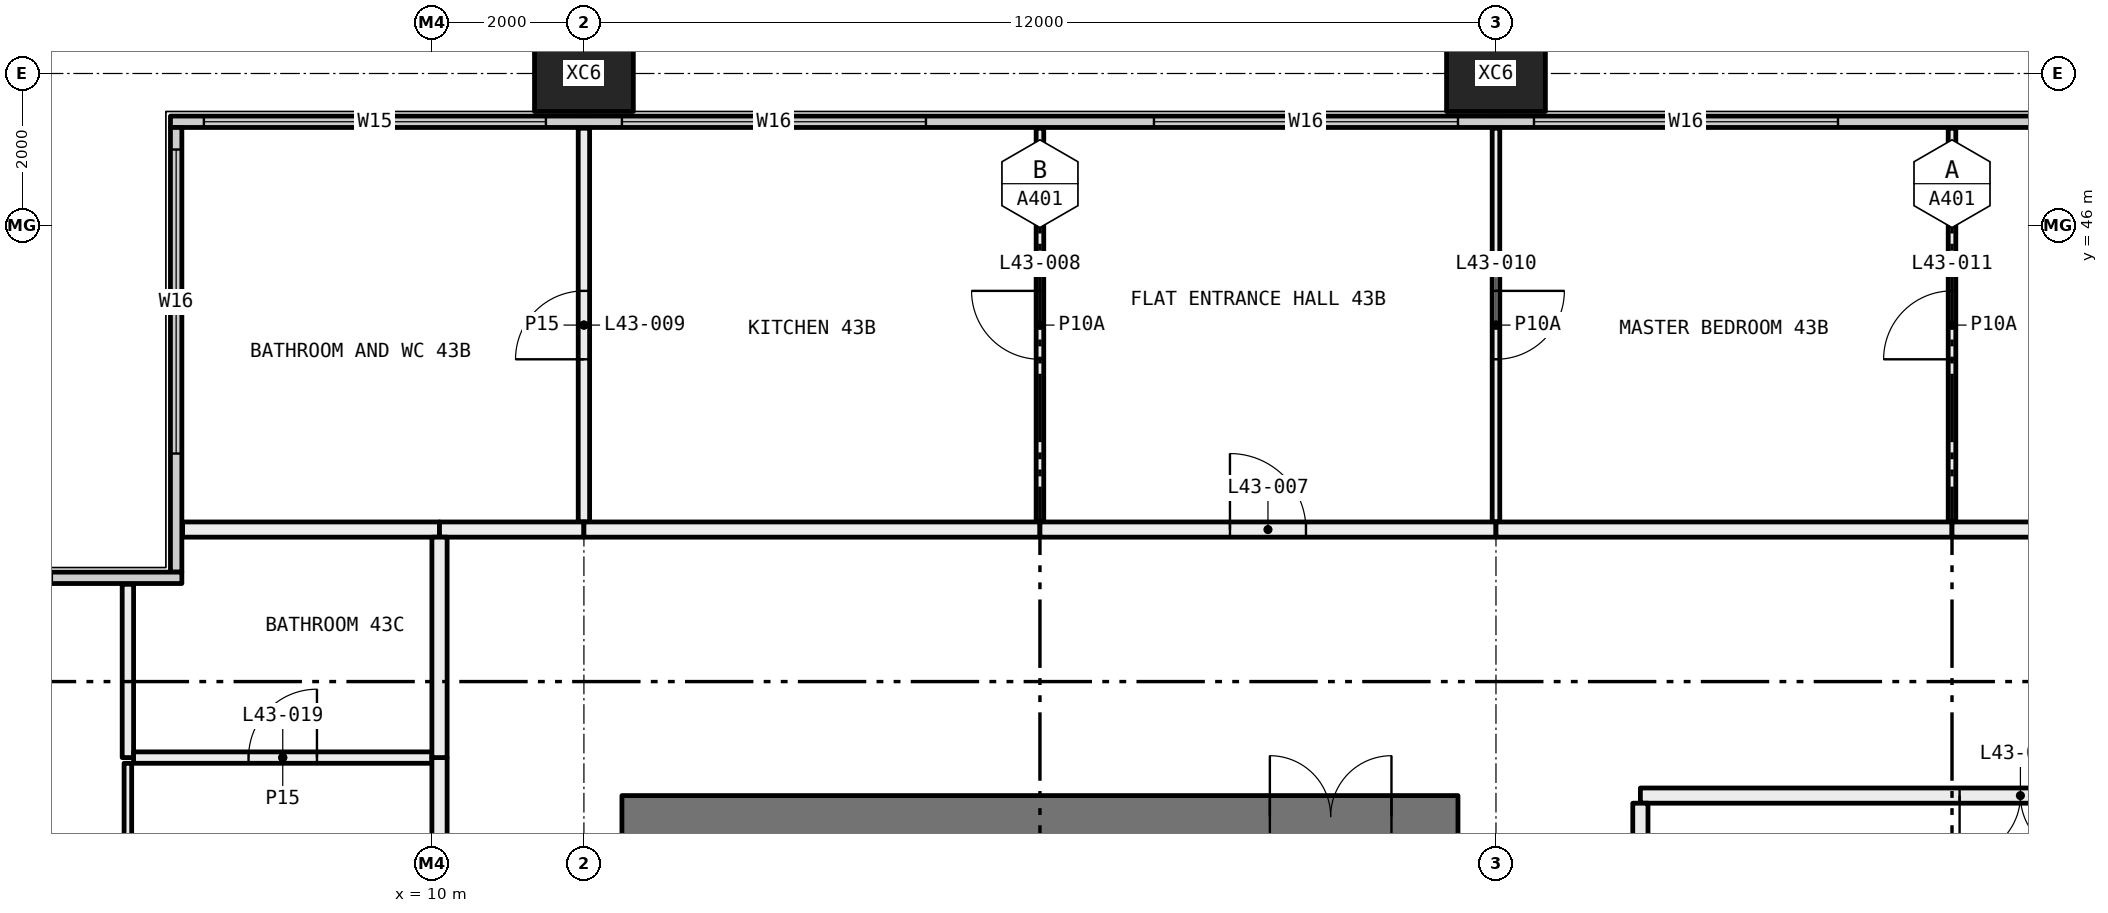
"""IFC4 building model, lengths in metres.
Left out: names, types, materials, properties, quantities, classifications, styles, units other than length and angle.
Written with IfcOpenShell. Run it as: python <this file> out.ifc"""

import sys

from ifc_helpers import new_model, si_unit, direction, frame, frame_2d, origin, origin_2d, place, context, subcontext, project, spatial, rectangle, hollow_rectangle, extrude, element, fill, save


model = new_model("IFC4")
c1 = context("Model", 3, precision=1e-05, world=origin(), true_north=direction((0.0, 1.0)))
c2 = subcontext(c1, "Body", "Model", "MODEL_VIEW")
j1 = project(units=[si_unit("LENGTHUNIT", "METRE"), si_unit("PLANEANGLEUNIT", "RADIAN")], contexts=[c1])
p1 = place(None, origin())
s1 = spatial("IfcSite", under=j1, at=p1, CompositionType="ELEMENT")
p2 = place(p1, origin())
s2 = spatial("IfcBuilding", under=s1, at=p2, CompositionType="ELEMENT")
p3 = place(p2, frame((0.0, 0.0, 165.15)))
s3 = spatial("IfcBuildingStorey", under=s2, at=p3, CompositionType="ELEMENT", Elevation=165.15)
for number, where, z_axis, x_axis in (
    (1, (12.0, 48.0, -0.4), (0.0, 0.0, 1.0), (1.0, 0.0, 0.0)),
    (2, (24.0, 48.0, -0.4), (0.0, 0.0, 1.0), (1.0, 0.0, 0.0)),
):
    element("IfcColumn", number, at=place(p3, frame(where, z_axis=z_axis, x_axis=x_axis)), inside=s3, PredefinedType="COLUMN", context=c2, shape_type="SweptSolid", body=[
        extrude(hollow_rectangle(XDim=1.3, YDim=1.0, WallThickness=0.05, at=origin_2d()), origin(), (0.0, 0.0, 1.0), 3.45),
    ])
p4 = place(p3, frame((6.56, 47.365, 0.0), z_axis=(0.0, 0.0, 1.0), x_axis=(1.0, 0.0, 0.0)))
e3 = element("IfcWall", 3, at=p4, inside=s3, PredefinedType="ELEMENTEDWALL", context=c2, shape_type="SweptSolid", body=[
    extrude(rectangle(XDim=46.88, YDim=0.15, at=frame_2d((23.44, 0.0))), origin(), (0.0, 0.0, 1.0), 3.05),
])
p5 = place(p4, frame((0.44, 0.0, 0.45)))
e4 = element("IfcOpeningElement", 4, at=p5, cuts=e3, PredefinedType="OPENING", context=c2, shape_type="SweptSolid", body=[
    extrude(rectangle(XDim=4.5, YDim=2.55, at=frame_2d((2.25, 1.275))), frame((0.0, 0.085, 0.0), z_axis=(0.0, -1.0, 0.0), x_axis=(1.0, 0.0, 0.0)), (0.0, 0.0, 1.0), 0.17),
])
p6 = place(p4, frame((5.94, 0.0, 0.45)))
e5 = element("IfcOpeningElement", 5, at=p6, cuts=e3, PredefinedType="OPENING", context=c2, shape_type="SweptSolid", body=[
    extrude(rectangle(XDim=4.0, YDim=2.55, at=frame_2d((2.0, 1.275))), frame((0.0, 0.085, 0.0), z_axis=(0.0, -1.0, 0.0), x_axis=(1.0, 0.0, 0.0)), (0.0, 0.0, 1.0), 0.17),
])
p7 = place(p4, frame((12.94, 0.0, 0.45)))
e6 = element("IfcOpeningElement", 6, at=p7, cuts=e3, PredefinedType="OPENING", context=c2, shape_type="SweptSolid", body=[
    extrude(rectangle(XDim=4.0, YDim=2.55, at=frame_2d((2.0, 1.275))), frame((0.0, 0.085, 0.0), z_axis=(0.0, -1.0, 0.0), x_axis=(1.0, 0.0, 0.0)), (0.0, 0.0, 1.0), 0.17),
])
p8 = place(p4, frame((17.94, 0.0, 0.45)))
e7 = element("IfcOpeningElement", 7, at=p8, cuts=e3, PredefinedType="OPENING", context=c2, shape_type="SweptSolid", body=[
    extrude(rectangle(XDim=4.0, YDim=2.55, at=frame_2d((2.0, 1.275))), frame((0.0, 0.085, 0.0), z_axis=(0.0, -1.0, 0.0), x_axis=(1.0, 0.0, 0.0)), (0.0, 0.0, 1.0), 0.17),
])
p9 = place(p4, frame((24.94, 0.0, 0.45)))
e8 = element("IfcOpeningElement", 8, at=p9, cuts=e3, PredefinedType="OPENING", context=c2, shape_type="SweptSolid", body=[
    extrude(rectangle(XDim=1.0, YDim=2.55, at=frame_2d((0.5, 1.275))), frame((0.0, 0.085, 0.0), z_axis=(0.0, -1.0, 0.0), x_axis=(1.0, 0.0, 0.0)), (0.0, 0.0, 1.0), 0.17),
])
p10 = place(p4, frame((26.94, 0.0, 0.45)))
e9 = element("IfcOpeningElement", 9, at=p10, cuts=e3, PredefinedType="OPENING", context=c2, shape_type="SweptSolid", body=[
    extrude(rectangle(XDim=2.0, YDim=2.55, at=frame_2d((1.0, 1.275))), frame((0.0, 0.085, 0.0), z_axis=(0.0, -1.0, 0.0), x_axis=(1.0, 0.0, 0.0)), (0.0, 0.0, 1.0), 0.17),
])
p11 = place(p4, frame((29.94, 0.0, 0.45)))
e10 = element("IfcOpeningElement", 10, at=p11, cuts=e3, PredefinedType="OPENING", context=c2, shape_type="SweptSolid", body=[
    extrude(rectangle(XDim=4.0, YDim=2.55, at=frame_2d((2.0, 1.275))), frame((0.0, 0.085, 0.0), z_axis=(0.0, -1.0, 0.0), x_axis=(1.0, 0.0, 0.0)), (0.0, 0.0, 1.0), 0.17),
])
p12 = place(p4, frame((36.94, 0.0, 0.45)))
e11 = element("IfcOpeningElement", 11, at=p12, cuts=e3, PredefinedType="OPENING", context=c2, shape_type="SweptSolid", body=[
    extrude(rectangle(XDim=4.0, YDim=2.55, at=frame_2d((2.0, 1.275))), frame((0.0, 0.085, 0.0), z_axis=(0.0, -1.0, 0.0), x_axis=(1.0, 0.0, 0.0)), (0.0, 0.0, 1.0), 0.17),
])
p13 = place(p4, frame((41.94, 0.0, 0.45)))
e12 = element("IfcOpeningElement", 12, at=p13, cuts=e3, PredefinedType="OPENING", context=c2, shape_type="SweptSolid", body=[
    extrude(rectangle(XDim=4.5, YDim=2.55, at=frame_2d((2.25, 1.275))), frame((0.0, 0.085, 0.0), z_axis=(0.0, -1.0, 0.0), x_axis=(1.0, 0.0, 0.0)), (0.0, 0.0, 1.0), 0.17),
])
p14 = place(p3, frame((6.635, 41.44, 0.0), z_axis=(0.0, 0.0, 1.0), x_axis=(0.0, 1.0, 0.0)))
e13 = element("IfcWall", 13, at=p14, inside=s3, PredefinedType="ELEMENTEDWALL", context=c2, shape_type="SweptSolid", body=[
    extrude(rectangle(XDim=5.85, YDim=0.15, at=frame_2d((2.925, 0.0))), origin(), (0.0, 0.0, 1.0), 3.05),
])
p15 = place(p14, frame((1.56, 0.0, 0.45)))
e14 = element("IfcOpeningElement", 14, at=p15, cuts=e13, PredefinedType="OPENING", context=c2, shape_type="SweptSolid", body=[
    extrude(rectangle(XDim=4.0, YDim=2.55, at=frame_2d((2.0, 1.275))), frame((0.0, 0.085, 0.0), z_axis=(0.0, -1.0, 0.0), x_axis=(1.0, 0.0, 0.0)), (0.0, 0.0, 1.0), 0.17),
])
p16 = place(p3, frame((0.56, 41.365, 0.0), z_axis=(0.0, 0.0, 1.0), x_axis=(1.0, 0.0, 0.0)))
e15 = element("IfcWall", 15, at=p16, inside=s3, PredefinedType="ELEMENTEDWALL", context=c2, shape_type="SweptSolid", body=[
    extrude(rectangle(XDim=6.15, YDim=0.15, at=frame_2d((3.075, 0.0))), origin(), (0.0, 0.0, 1.0), 3.05),
])
p17 = place(p16, frame((0.44, 0.0, 0.45)))
e16 = element("IfcOpeningElement", 16, at=p17, cuts=e15, PredefinedType="OPENING", context=c2, shape_type="SweptSolid", body=[
    extrude(rectangle(XDim=4.0, YDim=2.55, at=frame_2d((2.0, 1.275))), frame((0.0, 0.085, 0.0), z_axis=(0.0, -1.0, 0.0), x_axis=(1.0, 0.0, 0.0)), (0.0, 0.0, 1.0), 0.17),
])
p18 = place(p3, frame((12.0, 42.1, 0.0), z_axis=(0.0, 0.0, 1.0), x_axis=(0.0, 1.0, 0.0)))
e17 = element("IfcWall", 17, at=p18, inside=s3, PredefinedType="PARTITIONING", context=c2, shape_type="SweptSolid", body=[
    extrude(rectangle(XDim=5.18, YDim=0.15, at=frame_2d((2.59, 0.0))), origin(), (0.0, 0.0, 1.0), 3.05),
])
p19 = place(p18, frame((2.14, 0.0, 0.0)))
e18 = element("IfcOpeningElement", 18, at=p19, cuts=e17, PredefinedType="OPENING", context=c2, shape_type="SweptSolid", body=[
    extrude(rectangle(XDim=0.9, YDim=2.1, at=frame_2d((0.45, 1.05))), frame((0.0, 0.085, 0.0), z_axis=(0.0, -1.0, 0.0), x_axis=(1.0, 0.0, 0.0)), (0.0, 0.0, 1.0), 0.17),
])
p20 = place(p3, frame((6.72, 42.0, 0.0), z_axis=(0.0, 0.0, 1.0), x_axis=(1.0, 0.0, 0.0)))
e19 = element("IfcWall", 19, at=p20, inside=s3, PredefinedType="PARTITIONING", context=c2, shape_type="SweptSolid", body=[
    extrude(rectangle(XDim=3.38, YDim=0.2, at=frame_2d((1.69, 0.0))), origin(), (0.0, 0.0, 1.0), 3.05),
])
p21 = place(p3, frame((10.1, 42.0, 0.0), z_axis=(0.0, 0.0, 1.0), x_axis=(1.0, 0.0, 0.0)))
e20 = element("IfcWall", 20, at=p21, inside=s3, PredefinedType="PARTITIONING", context=c2, shape_type="SweptSolid", body=[
    extrude(rectangle(XDim=1.9, YDim=0.2, at=frame_2d((0.95, 0.0))), origin(), (0.0, 0.0, 1.0), 3.05),
])
p22 = place(p3, frame((18.0, 42.1, 0.0), z_axis=(0.0, 0.0, 1.0), x_axis=(0.0, 1.0, 0.0)))
e21 = element("IfcWall", 21, at=p22, inside=s3, PredefinedType="PARTITIONING", context=c2, shape_type="SweptSolid", body=[
    extrude(rectangle(XDim=5.18, YDim=0.1, at=frame_2d((2.59, 0.0))), origin(), (0.0, 0.0, 1.0), 3.05),
])
p23 = place(p22, frame((2.14, 0.0, 0.0)))
e22 = element("IfcOpeningElement", 22, at=p23, cuts=e21, PredefinedType="OPENING", context=c2, shape_type="SweptSolid", body=[
    extrude(rectangle(XDim=0.9, YDim=2.1, at=frame_2d((0.45, 1.05))), frame((0.0, 0.06, 0.0), z_axis=(0.0, -1.0, 0.0), x_axis=(1.0, 0.0, 0.0)), (0.0, 0.0, 1.0), 0.12),
])
p24 = place(p3, frame((12.0, 42.0, 0.0), z_axis=(0.0, 0.0, 1.0), x_axis=(1.0, 0.0, 0.0)))
e23 = element("IfcWall", 23, at=p24, inside=s3, PredefinedType="PARTITIONING", context=c2, shape_type="SweptSolid", body=[
    extrude(rectangle(XDim=6.0, YDim=0.2, at=frame_2d((3.0, 0.0))), origin(), (0.0, 0.0, 1.0), 3.05),
])
p25 = place(p3, frame((24.0, 42.1, 0.0), z_axis=(0.0, 0.0, 1.0), x_axis=(0.0, 1.0, 0.0)))
e24 = element("IfcWall", 24, at=p25, inside=s3, PredefinedType="PARTITIONING", context=c2, shape_type="SweptSolid", body=[
    extrude(rectangle(XDim=5.18, YDim=0.1, at=frame_2d((2.59, 0.0))), origin(), (0.0, 0.0, 1.0), 3.05),
])
p26 = place(p25, frame((2.14, 0.0, 0.0)))
e25 = element("IfcOpeningElement", 25, at=p26, cuts=e24, PredefinedType="OPENING", context=c2, shape_type="SweptSolid", body=[
    extrude(rectangle(XDim=0.9, YDim=2.1, at=frame_2d((0.45, 1.05))), frame((0.0, 0.06, 0.0), z_axis=(0.0, -1.0, 0.0), x_axis=(1.0, 0.0, 0.0)), (0.0, 0.0, 1.0), 0.12),
])
p27 = place(p3, frame((18.0, 42.0, 0.0), z_axis=(0.0, 0.0, 1.0), x_axis=(1.0, 0.0, 0.0)))
e26 = element("IfcWall", 26, at=p27, inside=s3, PredefinedType="PARTITIONING", context=c2, shape_type="SweptSolid", body=[
    extrude(rectangle(XDim=6.0, YDim=0.2, at=frame_2d((3.0, 0.0))), origin(), (0.0, 0.0, 1.0), 3.05),
])
p28 = place(p27, frame((2.5, 0.0, 0.0)))
e27 = element("IfcOpeningElement", 27, at=p28, cuts=e26, PredefinedType="OPENING", context=c2, shape_type="SweptSolid", body=[
    extrude(rectangle(XDim=1.0, YDim=2.1, at=frame_2d((0.5, 1.05))), frame((0.0, 0.11, 0.0), z_axis=(0.0, -1.0, 0.0), x_axis=(1.0, 0.0, 0.0)), (0.0, 0.0, 1.0), 0.22),
])
p29 = place(p3, frame((30.0, 42.1, 0.0), z_axis=(0.0, 0.0, 1.0), x_axis=(0.0, 1.0, 0.0)))
e28 = element("IfcWall", 28, at=p29, inside=s3, PredefinedType="PARTITIONING", context=c2, shape_type="SweptSolid", body=[
    extrude(rectangle(XDim=5.18, YDim=0.1, at=frame_2d((2.59, 0.0))), origin(), (0.0, 0.0, 1.0), 3.05),
])
p30 = place(p29, frame((2.14, 0.0, 0.0)))
e29 = element("IfcOpeningElement", 29, at=p30, cuts=e28, PredefinedType="OPENING", context=c2, shape_type="SweptSolid", body=[
    extrude(rectangle(XDim=0.9, YDim=2.1, at=frame_2d((0.45, 1.05))), frame((0.0, 0.06, 0.0), z_axis=(0.0, -1.0, 0.0), x_axis=(1.0, 0.0, 0.0)), (0.0, 0.0, 1.0), 0.12),
])
p31 = place(p3, frame((24.0, 42.0, 0.0), z_axis=(0.0, 0.0, 1.0), x_axis=(1.0, 0.0, 0.0)))
e30 = element("IfcWall", 30, at=p31, inside=s3, PredefinedType="PARTITIONING", context=c2, shape_type="SweptSolid", body=[
    extrude(rectangle(XDim=6.0, YDim=0.2, at=frame_2d((3.0, 0.0))), origin(), (0.0, 0.0, 1.0), 3.05),
])
p32 = place(p3, frame((30.0, 42.0, 0.0), z_axis=(0.0, 0.0, 1.0), x_axis=(1.0, 0.0, 0.0)))
e31 = element("IfcWall", 31, at=p32, inside=s3, PredefinedType="PARTITIONING", context=c2, shape_type="SweptSolid", body=[
    extrude(rectangle(XDim=5.9, YDim=0.2, at=frame_2d((2.95, 0.0))), origin(), (0.0, 0.0, 1.0), 3.05),
])
p33 = place(p3, frame((6.0, 36.1, 0.0), z_axis=(0.0, 0.0, 1.0), x_axis=(0.0, 1.0, 0.0)))
e32 = element("IfcWall", 32, at=p33, inside=s3, PredefinedType="PARTITIONING", context=c2, shape_type="SweptSolid", body=[
    extrude(rectangle(XDim=2.825, YDim=0.1, at=frame_2d((1.413, 0.0))), origin(), (0.0, 0.0, 1.0), 3.05),
])
p34 = place(p3, frame((6.0, 39.0, 0.0), z_axis=(0.0, 0.0, 1.0), x_axis=(0.0, 1.0, 0.0)))
e33 = element("IfcWall", 33, at=p34, inside=s3, PredefinedType="PARTITIONING", context=c2, shape_type="SweptSolid", body=[
    extrude(rectangle(XDim=2.28, YDim=0.15, at=frame_2d((1.14, 0.0))), origin(), (0.0, 0.0, 1.0), 3.05),
])
p35 = place(p3, frame((10.0, 39.0, 0.0), z_axis=(0.0, 0.0, 1.0), x_axis=(-1.0, 0.0, 0.0)))
e34 = element("IfcWall", 34, at=p35, inside=s3, PredefinedType="PARTITIONING", context=c2, shape_type="SweptSolid", body=[
    extrude(rectangle(XDim=3.925, YDim=0.15, at=frame_2d((1.962, 0.0))), origin(), (0.0, 0.0, 1.0), 3.05),
])
p36 = place(p35, frame((1.512, 0.0, 0.0)))
e35 = element("IfcOpeningElement", 35, at=p36, cuts=e34, PredefinedType="OPENING", context=c2, shape_type="SweptSolid", body=[
    extrude(rectangle(XDim=0.9, YDim=2.1, at=frame_2d((0.45, 1.05))), frame((0.0, 0.085, 0.0), z_axis=(0.0, -1.0, 0.0), x_axis=(1.0, 0.0, 0.0)), (0.0, 0.0, 1.0), 0.17),
])
for number, where, z_axis, x_axis in (
    (36, (10.1, 36.1, 0.0), (0.0, 0.0, 1.0), (0.0, 1.0, 0.0)),
    (37, (10.1, 39.0, 0.0), (0.0, 0.0, 1.0), (0.0, 1.0, 0.0)),
):
    element("IfcWall", number, at=place(p3, frame(where, z_axis=z_axis, x_axis=x_axis)), inside=s3, PredefinedType="PARTITIONING", context=c2, shape_type="SweptSolid", body=[
        extrude(rectangle(XDim=2.9, YDim=0.2, at=frame_2d((1.45, 0.0))), origin(), (0.0, 0.0, 1.0), 3.05),
    ])
p37 = place(p3, frame((35.9, 38.5, 0.0), z_axis=(0.0, 0.0, 1.0), x_axis=(-1.0, 0.0, 0.0)))
e38 = element("IfcWall", 38, at=p37, inside=s3, PredefinedType="PARTITIONING", context=c2, shape_type="SweptSolid", body=[
    extrude(rectangle(XDim=10.0, YDim=0.2, at=frame_2d((5.0, 0.0))), origin(), (0.0, 0.0, 1.0), 3.05),
])
p38 = place(p37, frame((4.2, 0.0, 0.0)))
e39 = element("IfcOpeningElement", 39, at=p38, cuts=e38, PredefinedType="OPENING", context=c2, shape_type="SweptSolid", body=[
    extrude(rectangle(XDim=1.6, YDim=2.1, at=frame_2d((0.8, 1.05))), frame((0.0, 0.11, 0.0), z_axis=(0.0, -1.0, 0.0), x_axis=(1.0, 0.0, 0.0)), (0.0, 0.0, 1.0), 0.22),
])
p39 = place(p3, frame((25.9, 38.4, 0.0), z_axis=(0.0, 0.0, 1.0), x_axis=(0.0, -1.0, 0.0)))
e40 = element("IfcWall", 40, at=p39, inside=s3, PredefinedType="PARTITIONING", context=c2, shape_type="SweptSolid", body=[
    extrude(rectangle(XDim=2.5, YDim=0.2, at=frame_2d((1.25, 0.0))), origin(), (0.0, 0.0, 1.0), 2.45),
])
p40 = place(p3, frame((12.5, 38.225, 0.0), z_axis=(0.0, 0.0, 1.0), x_axis=(1.0, 0.0, 0.0)))
e41 = element("IfcWall", 41, at=p40, inside=s3, PredefinedType="SHEAR", context=c2, shape_type="SweptSolid", body=[
    extrude(rectangle(XDim=11.0, YDim=0.55, at=frame_2d((5.5, 0.0))), origin(), (0.0, 0.0, 1.0), 3.05),
])
p41 = place(p40, frame((8.525, 0.0, 0.0)))
e42 = element("IfcOpeningElement", 42, at=p41, cuts=e41, PredefinedType="OPENING", context=c2, shape_type="SweptSolid", body=[
    extrude(rectangle(XDim=1.6, YDim=2.1, at=frame_2d((0.8, 1.05))), frame((0.0, 0.285, 0.0), z_axis=(0.0, -1.0, 0.0), x_axis=(1.0, 0.0, 0.0)), (0.0, 0.0, 1.0), 0.57),
])
p42 = place(p5, origin())
e43 = element("IfcWindow", 43, at=p42, inside=s3, PartitioningType="SINGLE_PANEL", PredefinedType="WINDOW", context=c2, shape_type="SweptSolid", body=[
    extrude(rectangle(XDim=4.5, YDim=2.55, at=frame_2d((2.25, 1.275))), frame((0.0, 0.03, 0.0), z_axis=(0.0, -1.0, 0.0), x_axis=(1.0, 0.0, 0.0)), (0.0, 0.0, 1.0), 0.06),
])
fill(e4, e43)
p43 = place(p6, origin())
e44 = element("IfcWindow", 44, at=p43, inside=s3, PartitioningType="SINGLE_PANEL", PredefinedType="WINDOW", context=c2, shape_type="SweptSolid", body=[
    extrude(rectangle(XDim=4.0, YDim=2.55, at=frame_2d((2.0, 1.275))), frame((0.0, 0.03, 0.0), z_axis=(0.0, -1.0, 0.0), x_axis=(1.0, 0.0, 0.0)), (0.0, 0.0, 1.0), 0.06),
])
fill(e5, e44)
p44 = place(p7, origin())
e45 = element("IfcWindow", 45, at=p44, inside=s3, PartitioningType="SINGLE_PANEL", PredefinedType="WINDOW", context=c2, shape_type="SweptSolid", body=[
    extrude(rectangle(XDim=4.0, YDim=2.55, at=frame_2d((2.0, 1.275))), frame((0.0, 0.03, 0.0), z_axis=(0.0, -1.0, 0.0), x_axis=(1.0, 0.0, 0.0)), (0.0, 0.0, 1.0), 0.06),
])
fill(e6, e45)
p45 = place(p8, origin())
e46 = element("IfcWindow", 46, at=p45, inside=s3, PartitioningType="SINGLE_PANEL", PredefinedType="WINDOW", context=c2, shape_type="SweptSolid", body=[
    extrude(rectangle(XDim=4.0, YDim=2.55, at=frame_2d((2.0, 1.275))), frame((0.0, 0.03, 0.0), z_axis=(0.0, -1.0, 0.0), x_axis=(1.0, 0.0, 0.0)), (0.0, 0.0, 1.0), 0.06),
])
fill(e7, e46)
p46 = place(p15, origin())
e47 = element("IfcWindow", 47, at=p46, inside=s3, PartitioningType="SINGLE_PANEL", PredefinedType="WINDOW", context=c2, shape_type="SweptSolid", body=[
    extrude(rectangle(XDim=4.0, YDim=2.55, at=frame_2d((2.0, 1.275))), frame((0.0, 0.03, 0.0), z_axis=(0.0, -1.0, 0.0), x_axis=(1.0, 0.0, 0.0)), (0.0, 0.0, 1.0), 0.06),
])
fill(e14, e47)
p47 = place(p28, origin())
e48 = element("IfcDoor", 48, at=p47, inside=s3, OperationType="SINGLE_SWING_RIGHT", PredefinedType="DOOR", context=c2, shape_type="SweptSolid", body=[
    extrude(rectangle(XDim=1.0, YDim=2.1, at=frame_2d((0.5, 1.05))), frame((0.0, 0.025, 0.0), z_axis=(0.0, -1.0, 0.0), x_axis=(1.0, 0.0, 0.0)), (0.0, 0.0, 1.0), 0.05),
])
fill(e27, e48)
p48 = place(p23, origin())
e49 = element("IfcDoor", 49, at=p48, inside=s3, OperationType="SINGLE_SWING_LEFT", PredefinedType="DOOR", context=c2, shape_type="SweptSolid", body=[
    extrude(rectangle(XDim=0.9, YDim=2.1, at=frame_2d((0.45, 1.05))), frame((0.0, 0.025, 0.0), z_axis=(0.0, -1.0, 0.0), x_axis=(1.0, 0.0, 0.0)), (0.0, 0.0, 1.0), 0.05),
])
fill(e22, e49)
p49 = place(p19, origin())
e50 = element("IfcDoor", 50, at=p49, inside=s3, OperationType="SINGLE_SWING_RIGHT", PredefinedType="DOOR", context=c2, shape_type="SweptSolid", body=[
    extrude(rectangle(XDim=0.9, YDim=2.1, at=frame_2d((0.45, 1.05))), frame((0.0, 0.025, 0.0), z_axis=(0.0, -1.0, 0.0), x_axis=(1.0, 0.0, 0.0)), (0.0, 0.0, 1.0), 0.05),
])
fill(e18, e50)
p50 = place(p26, frame((0.9, 0.0, 0.0), x_axis=(-1.0, 0.0, 0.0)))
e51 = element("IfcDoor", 51, at=p50, inside=s3, OperationType="SINGLE_SWING_RIGHT", PredefinedType="DOOR", context=c2, shape_type="SweptSolid", body=[
    extrude(rectangle(XDim=0.9, YDim=2.1, at=frame_2d((0.45, 1.05))), frame((0.0, 0.025, 0.0), z_axis=(0.0, -1.0, 0.0), x_axis=(1.0, 0.0, 0.0)), (0.0, 0.0, 1.0), 0.05),
])
fill(e25, e51)
p51 = place(p30, origin())
e52 = element("IfcDoor", 52, at=p51, inside=s3, OperationType="SINGLE_SWING_RIGHT", PredefinedType="DOOR", context=c2, shape_type="SweptSolid", body=[
    extrude(rectangle(XDim=0.9, YDim=2.1, at=frame_2d((0.45, 1.05))), frame((0.0, 0.025, 0.0), z_axis=(0.0, -1.0, 0.0), x_axis=(1.0, 0.0, 0.0)), (0.0, 0.0, 1.0), 0.05),
])
fill(e29, e52)
p52 = place(p36, frame((0.9, 0.0, 0.0), x_axis=(-1.0, 0.0, 0.0)))
e53 = element("IfcDoor", 53, at=p52, inside=s3, OperationType="SINGLE_SWING_LEFT", PredefinedType="DOOR", context=c2, shape_type="SweptSolid", body=[
    extrude(rectangle(XDim=0.9, YDim=2.1, at=frame_2d((0.45, 1.05))), frame((0.0, 0.025, 0.0), z_axis=(0.0, -1.0, 0.0), x_axis=(1.0, 0.0, 0.0)), (0.0, 0.0, 1.0), 0.05),
])
fill(e35, e53)
p53 = place(p38, origin())
e54 = element("IfcDoor", 54, at=p53, inside=s3, OperationType="DOUBLE_DOOR_SINGLE_SWING", PredefinedType="DOOR", context=c2, shape_type="SweptSolid", body=[
    extrude(rectangle(XDim=1.6, YDim=2.1, at=frame_2d((0.8, 1.05))), frame((0.0, 0.025, 0.0), z_axis=(0.0, -1.0, 0.0), x_axis=(1.0, 0.0, 0.0)), (0.0, 0.0, 1.0), 0.05),
])
fill(e39, e54)
p54 = place(p41, origin())
e55 = element("IfcDoor", 55, at=p54, inside=s3, OperationType="DOUBLE_DOOR_SINGLE_SWING", PredefinedType="DOOR", context=c2, shape_type="SweptSolid", body=[
    extrude(rectangle(XDim=1.6, YDim=2.1, at=frame_2d((0.8, 1.05))), frame((0.0, 0.025, 0.0), z_axis=(0.0, -1.0, 0.0), x_axis=(1.0, 0.0, 0.0)), (0.0, 0.0, 1.0), 0.05),
])
fill(e42, e55)
save(model, sys.argv[1])
